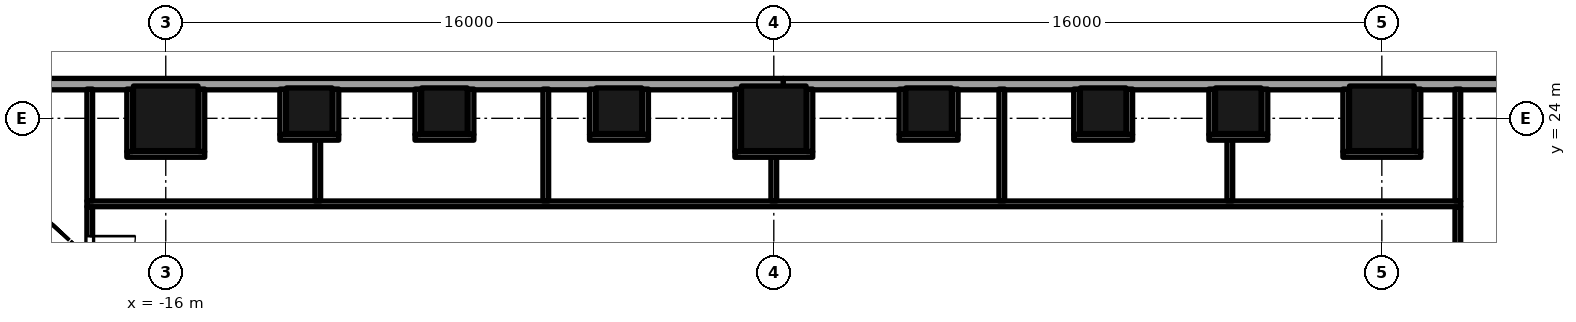
"""IFC4 building model, lengths in metres.
Left out: names, types, materials, properties, quantities, classifications, styles, units other than length and angle.
Written with IfcOpenShell. Run it as: python <this file> out.ifc"""

import sys

from ifc_helpers import new_model, si_unit, direction, frame, frame_2d, origin, origin_2d, place, context, subcontext, project, spatial, rectangle, extrude, element, fill, save


model = new_model("IFC4")
c1 = context("Model", 3, precision=1e-05, world=origin(), true_north=direction((0.0, 1.0)))
c2 = subcontext(c1, "Body", "Model", "MODEL_VIEW")
j1 = project(units=[si_unit("LENGTHUNIT", "METRE"), si_unit("PLANEANGLEUNIT", "RADIAN")], contexts=[c1])
p1 = place(None, origin())
s1 = spatial("IfcSite", under=j1, at=p1, CompositionType="ELEMENT")
p2 = place(p1, origin())
s2 = spatial("IfcBuilding", under=s1, at=p2, CompositionType="ELEMENT")
p3 = place(p2, origin())
s3 = spatial("IfcBuildingStorey", under=s2, at=p3, CompositionType="ELEMENT", Elevation=0.0)
for number, where, z_axis, x_axis in (
    (1, (-16.0, 24.0, 0.0), (0.0, 0.0, 1.0), (1.0, 0.0, 0.0)),
    (2, (0.0, 24.0, 0.0), (0.0, 0.0, 1.0), (1.0, 0.0, 0.0)),
    (3, (16.0, 24.0, 0.0), (0.0, 0.0, 1.0), (1.0, 0.0, 0.0)),
):
    element("IfcColumn", number, at=place(p3, frame(where, z_axis=z_axis, x_axis=x_axis)), inside=s3, PredefinedType="COLUMN", context=c2, shape_type="SweptSolid", body=[
        extrude(rectangle(XDim=1.7, YDim=1.7, at=origin_2d()), origin(), (0.0, 0.0, 1.0), 9.0),
    ])
for number, where, z_axis, x_axis in (
    (4, (-8.667, 24.2, 0.0), (0.0, 0.0, 1.0), (1.0, 0.0, 0.0)),
    (5, (8.667, 24.2, 0.0), (0.0, 0.0, 1.0), (1.0, 0.0, 0.0)),
    (6, (-12.223, 24.2, 0.0), (0.0, 0.0, 1.0), (1.0, 0.0, 0.0)),
    (7, (-4.074, 24.2, 0.0), (0.0, 0.0, 1.0), (1.0, 0.0, 0.0)),
    (8, (4.074, 24.2, 0.0), (0.0, 0.0, 1.0), (1.0, 0.0, 0.0)),
    (9, (12.223, 24.2, 0.0), (0.0, 0.0, 1.0), (1.0, 0.0, 0.0)),
):
    element("IfcColumn", number, at=place(p3, frame(where, z_axis=z_axis, x_axis=x_axis)), inside=s3, PredefinedType="COLUMN", context=c2, shape_type="SweptSolid", body=[
        extrude(rectangle(XDim=1.2, YDim=1.2, at=origin_2d()), origin(), (0.0, 0.0, 1.0), 9.0),
    ])
p4 = place(p3, frame((25.396, 24.9, 0.0), z_axis=(0.0, 0.0, 1.0), x_axis=(-1.0, 0.0, 0.0)))
e10 = element("IfcWall", 10, at=p4, inside=s3, PredefinedType="ELEMENTEDWALL", context=c2, shape_type="SweptSolid", body=[
    extrude(rectangle(XDim=25.15, YDim=0.3, at=frame_2d((12.575, 0.0))), origin(), (0.0, 0.0, 1.0), 7.6),
])
p5 = place(p4, frame((0.4, 0.0, 0.0)))
e11 = element("IfcOpeningElement", 11, at=p5, cuts=e10, PredefinedType="OPENING", context=c2, shape_type="SweptSolid", body=[
    extrude(rectangle(XDim=3.0, YDim=2.7, at=frame_2d((1.5, 1.35))), frame((0.0, 0.16, 0.0), z_axis=(0.0, -1.0, 0.0), x_axis=(1.0, 0.0, 0.0)), (0.0, 0.0, 1.0), 0.32),
])
p6 = place(p3, frame((0.246, 24.9, 0.0), z_axis=(0.0, 0.0, 1.0), x_axis=(-1.0, 0.0, 0.0)))
e12 = element("IfcWall", 12, at=p6, inside=s3, PredefinedType="ELEMENTEDWALL", context=c2, shape_type="SweptSolid", body=[
    extrude(rectangle(XDim=25.15, YDim=0.3, at=frame_2d((12.575, 0.0))), origin(), (0.0, 0.0, 1.0), 7.6),
])
p7 = place(p6, frame((21.75, 0.0, 0.0)))
e13 = element("IfcOpeningElement", 13, at=p7, cuts=e12, PredefinedType="OPENING", context=c2, shape_type="SweptSolid", body=[
    extrude(rectangle(XDim=3.0, YDim=2.7, at=frame_2d((1.5, 1.35))), frame((0.0, 0.16, 0.0), z_axis=(0.0, -1.0, 0.0), x_axis=(1.0, 0.0, 0.0)), (0.0, 0.0, 1.0), 0.32),
])
p8 = place(p3, frame((-18.0, 19.278, 0.0), z_axis=(0.0, 0.0, 1.0), x_axis=(0.0, 1.0, 0.0)))
e14 = element("IfcWall", 14, at=p8, inside=s3, PredefinedType="PARTITIONING", context=c2, shape_type="SweptSolid", body=[
    extrude(rectangle(XDim=2.397, YDim=0.15, at=frame_2d((1.198, 0.0))), origin(), (0.0, 0.0, 1.0), 8.5),
])
p9 = place(p8, frame((0.422, 0.0, 0.0)))
e15 = element("IfcOpeningElement", 15, at=p9, cuts=e14, PredefinedType="OPENING", context=c2, shape_type="SweptSolid", body=[
    extrude(rectangle(XDim=1.2, YDim=2.1, at=frame_2d((0.6, 1.05))), frame((0.0, 0.085, 0.0), z_axis=(0.0, -1.0, 0.0), x_axis=(1.0, 0.0, 0.0)), (0.0, 0.0, 1.0), 0.17),
])
p10 = place(p3, frame((18.0, 19.278, 0.0), z_axis=(0.0, 0.0, 1.0), x_axis=(0.0, 1.0, 0.0)))
e16 = element("IfcWall", 16, at=p10, inside=s3, PredefinedType="PARTITIONING", context=c2, shape_type="SweptSolid", body=[
    extrude(rectangle(XDim=2.397, YDim=0.15, at=frame_2d((1.198, 0.0))), origin(), (0.0, 0.0, 1.0), 8.5),
])
p11 = place(p3, frame((-18.075, 21.75, 0.0), z_axis=(0.0, 0.0, 1.0), x_axis=(1.0, 0.0, 0.0)))
e17 = element("IfcWall", 17, at=p11, inside=s3, PredefinedType="PARTITIONING", context=c2, shape_type="SweptSolid", body=[
    extrude(rectangle(XDim=36.15, YDim=0.15, at=frame_2d((18.075, 0.0))), origin(), (0.0, 0.0, 1.0), 7.3),
])
p12 = place(p11, frame((2.675, 0.0, 0.0)))
e18 = element("IfcOpeningElement", 18, at=p12, cuts=e17, PredefinedType="OPENING", context=c2, shape_type="SweptSolid", body=[
    extrude(rectangle(XDim=0.9, YDim=2.1, at=frame_2d((0.45, 1.05))), frame((0.0, 0.085, 0.0), z_axis=(0.0, -1.0, 0.0), x_axis=(1.0, 0.0, 0.0)), (0.0, 0.0, 1.0), 0.17),
])
p13 = place(p11, frame((8.675, 0.0, 0.0)))
e19 = element("IfcOpeningElement", 19, at=p13, cuts=e17, PredefinedType="OPENING", context=c2, shape_type="SweptSolid", body=[
    extrude(rectangle(XDim=0.9, YDim=2.1, at=frame_2d((0.45, 1.05))), frame((0.0, 0.085, 0.0), z_axis=(0.0, -1.0, 0.0), x_axis=(1.0, 0.0, 0.0)), (0.0, 0.0, 1.0), 0.17),
])
p14 = place(p11, frame((14.675, 0.0, 0.0)))
e20 = element("IfcOpeningElement", 20, at=p14, cuts=e17, PredefinedType="OPENING", context=c2, shape_type="SweptSolid", body=[
    extrude(rectangle(XDim=0.9, YDim=2.1, at=frame_2d((0.45, 1.05))), frame((0.0, 0.085, 0.0), z_axis=(0.0, -1.0, 0.0), x_axis=(1.0, 0.0, 0.0)), (0.0, 0.0, 1.0), 0.17),
])
p15 = place(p11, frame((20.675, 0.0, 0.0)))
e21 = element("IfcOpeningElement", 21, at=p15, cuts=e17, PredefinedType="OPENING", context=c2, shape_type="SweptSolid", body=[
    extrude(rectangle(XDim=0.9, YDim=2.1, at=frame_2d((0.45, 1.05))), frame((0.0, 0.085, 0.0), z_axis=(0.0, -1.0, 0.0), x_axis=(1.0, 0.0, 0.0)), (0.0, 0.0, 1.0), 0.17),
])
p16 = place(p11, frame((26.675, 0.0, 0.0)))
e22 = element("IfcOpeningElement", 22, at=p16, cuts=e17, PredefinedType="OPENING", context=c2, shape_type="SweptSolid", body=[
    extrude(rectangle(XDim=0.9, YDim=2.1, at=frame_2d((0.45, 1.05))), frame((0.0, 0.085, 0.0), z_axis=(0.0, -1.0, 0.0), x_axis=(1.0, 0.0, 0.0)), (0.0, 0.0, 1.0), 0.17),
])
p17 = place(p11, frame((32.675, 0.0, 0.0)))
e23 = element("IfcOpeningElement", 23, at=p17, cuts=e17, PredefinedType="OPENING", context=c2, shape_type="SweptSolid", body=[
    extrude(rectangle(XDim=0.9, YDim=2.1, at=frame_2d((0.45, 1.05))), frame((0.0, 0.085, 0.0), z_axis=(0.0, -1.0, 0.0), x_axis=(1.0, 0.0, 0.0)), (0.0, 0.0, 1.0), 0.17),
])
p18 = place(p3, frame((-18.0, 21.825, 0.0), z_axis=(0.0, 0.0, 1.0), x_axis=(0.0, 1.0, 0.0)))
e24 = element("IfcWall", 24, at=p18, inside=s3, PredefinedType="PARTITIONING", context=c2, shape_type="SweptSolid", body=[
    extrude(rectangle(XDim=2.945, YDim=0.15, at=frame_2d((1.473, 0.0))), origin(), (0.0, 0.0, 1.0), 7.3),
])
p19 = place(p3, frame((-12.0, 21.825, 0.0), z_axis=(0.0, 0.0, 1.0), x_axis=(0.0, 1.0, 0.0)))
e25 = element("IfcWall", 25, at=p19, inside=s3, PredefinedType="PARTITIONING", context=c2, shape_type="SweptSolid", body=[
    extrude(rectangle(XDim=1.775, YDim=0.15, at=frame_2d((0.888, 0.0))), origin(), (0.0, 0.0, 1.0), 8.5),
])
p20 = place(p3, frame((-6.0, 21.825, 0.0), z_axis=(0.0, 0.0, 1.0), x_axis=(0.0, 1.0, 0.0)))
e26 = element("IfcWall", 26, at=p20, inside=s3, PredefinedType="PARTITIONING", context=c2, shape_type="SweptSolid", body=[
    extrude(rectangle(XDim=2.945, YDim=0.15, at=frame_2d((1.473, 0.0))), origin(), (0.0, 0.0, 1.0), 7.3),
])
p21 = place(p3, frame((0.0, 21.825, 0.0), z_axis=(0.0, 0.0, 1.0), x_axis=(0.0, 1.0, 0.0)))
e27 = element("IfcWall", 27, at=p21, inside=s3, PredefinedType="PARTITIONING", context=c2, shape_type="SweptSolid", body=[
    extrude(rectangle(XDim=1.325, YDim=0.15, at=frame_2d((0.663, 0.0))), origin(), (0.0, 0.0, 1.0), 7.3),
])
p22 = place(p3, frame((6.0, 21.825, 0.0), z_axis=(0.0, 0.0, 1.0), x_axis=(0.0, 1.0, 0.0)))
e28 = element("IfcWall", 28, at=p22, inside=s3, PredefinedType="PARTITIONING", context=c2, shape_type="SweptSolid", body=[
    extrude(rectangle(XDim=2.945, YDim=0.15, at=frame_2d((1.473, 0.0))), origin(), (0.0, 0.0, 1.0), 7.3),
])
p23 = place(p3, frame((12.0, 21.825, 0.0), z_axis=(0.0, 0.0, 1.0), x_axis=(0.0, 1.0, 0.0)))
e29 = element("IfcWall", 29, at=p23, inside=s3, PredefinedType="PARTITIONING", context=c2, shape_type="SweptSolid", body=[
    extrude(rectangle(XDim=1.775, YDim=0.15, at=frame_2d((0.888, 0.0))), origin(), (0.0, 0.0, 1.0), 8.5),
])
p24 = place(p3, frame((18.0, 21.825, 0.0), z_axis=(0.0, 0.0, 1.0), x_axis=(0.0, 1.0, 0.0)))
e30 = element("IfcWall", 30, at=p24, inside=s3, PredefinedType="PARTITIONING", context=c2, shape_type="SweptSolid", body=[
    extrude(rectangle(XDim=2.945, YDim=0.15, at=frame_2d((1.473, 0.0))), origin(), (0.0, 0.0, 1.0), 7.3),
])
for number, where, z_axis, x_axis in (
    (31, (-17.025, 23.05, 0.0), (0.0, 0.0, 1.0), (1.0, 0.0, 0.0)),
    (32, (-1.025, 23.05, 0.0), (0.0, 0.0, 1.0), (1.0, 0.0, 0.0)),
    (33, (14.975, 23.05, 0.0), (0.0, 0.0, 1.0), (1.0, 0.0, 0.0)),
):
    element("IfcWall", number, at=place(p3, frame(where, z_axis=z_axis, x_axis=x_axis)), inside=s3, PredefinedType="PARTITIONING", context=c2, shape_type="SweptSolid", body=[
        extrude(rectangle(XDim=2.05, YDim=0.15, at=frame_2d((1.025, 0.0))), origin(), (0.0, 0.0, 1.0), 7.3),
    ])
for number, where, z_axis, x_axis in (
    (34, (-16.95, 23.125, 0.0), (0.0, 0.0, 1.0), (0.0, 1.0, 0.0)),
    (35, (-15.05, 23.125, 0.0), (0.0, 0.0, 1.0), (0.0, 1.0, 0.0)),
    (36, (-0.95, 23.125, 0.0), (0.0, 0.0, 1.0), (0.0, 1.0, 0.0)),
    (37, (0.95, 23.125, 0.0), (0.0, 0.0, 1.0), (0.0, 1.0, 0.0)),
    (38, (15.05, 23.125, 0.0), (0.0, 0.0, 1.0), (0.0, 1.0, 0.0)),
    (39, (16.95, 23.125, 0.0), (0.0, 0.0, 1.0), (0.0, 1.0, 0.0)),
):
    element("IfcWall", number, at=place(p3, frame(where, z_axis=z_axis, x_axis=x_axis)), inside=s3, PredefinedType="PARTITIONING", context=c2, shape_type="SweptSolid", body=[
        extrude(rectangle(XDim=1.645, YDim=0.15, at=frame_2d((0.823, 0.0))), origin(), (0.0, 0.0, 1.0), 7.3),
    ])
p25 = place(p3, frame((-12.998, 23.5, 0.0), z_axis=(0.0, 0.0, 1.0), x_axis=(1.0, 0.0, 0.0)))
e40 = element("IfcWall", 40, at=p25, inside=s3, PredefinedType="PARTITIONING", context=c2, shape_type="SweptSolid", body=[
    extrude(rectangle(XDim=1.55, YDim=0.15, at=frame_2d((0.775, 0.0))), origin(), (0.0, 0.0, 1.0), 8.5),
])
p26 = place(p3, frame((-9.442, 23.5, 0.0), z_axis=(0.0, 0.0, 1.0), x_axis=(1.0, 0.0, 0.0)))
e41 = element("IfcWall", 41, at=p26, inside=s3, PredefinedType="PARTITIONING", context=c2, shape_type="SweptSolid", body=[
    extrude(rectangle(XDim=1.55, YDim=0.15, at=frame_2d((0.775, 0.0))), origin(), (0.0, 0.0, 1.0), 7.6),
])
for number, where, z_axis, x_axis in (
    (42, (-4.849, 23.5, 0.0), (0.0, 0.0, 1.0), (1.0, 0.0, 0.0)),
    (43, (3.299, 23.5, 0.0), (0.0, 0.0, 1.0), (1.0, 0.0, 0.0)),
):
    element("IfcWall", number, at=place(p3, frame(where, z_axis=z_axis, x_axis=x_axis)), inside=s3, PredefinedType="PARTITIONING", context=c2, shape_type="SweptSolid", body=[
        extrude(rectangle(XDim=1.55, YDim=0.15, at=frame_2d((0.775, 0.0))), origin(), (0.0, 0.0, 1.0), 8.5),
    ])
p27 = place(p3, frame((7.892, 23.5, 0.0), z_axis=(0.0, 0.0, 1.0), x_axis=(1.0, 0.0, 0.0)))
e44 = element("IfcWall", 44, at=p27, inside=s3, PredefinedType="PARTITIONING", context=c2, shape_type="SweptSolid", body=[
    extrude(rectangle(XDim=1.55, YDim=0.15, at=frame_2d((0.775, 0.0))), origin(), (0.0, 0.0, 1.0), 7.6),
])
p28 = place(p3, frame((11.448, 23.5, 0.0), z_axis=(0.0, 0.0, 1.0), x_axis=(1.0, 0.0, 0.0)))
e45 = element("IfcWall", 45, at=p28, inside=s3, PredefinedType="PARTITIONING", context=c2, shape_type="SweptSolid", body=[
    extrude(rectangle(XDim=1.55, YDim=0.15, at=frame_2d((0.775, 0.0))), origin(), (0.0, 0.0, 1.0), 8.5),
])
for number, where, z_axis, x_axis in (
    (46, (-12.923, 23.575, 0.0), (0.0, 0.0, 1.0), (0.0, 1.0, 0.0)),
    (47, (-11.523, 23.575, 0.0), (0.0, 0.0, 1.0), (0.0, 1.0, 0.0)),
    (48, (-9.367, 23.575, 0.0), (0.0, 0.0, 1.0), (0.0, 1.0, 0.0)),
    (49, (-7.967, 23.575, 0.0), (0.0, 0.0, 1.0), (0.0, 1.0, 0.0)),
    (50, (-4.774, 23.575, 0.0), (0.0, 0.0, 1.0), (0.0, 1.0, 0.0)),
    (51, (-3.374, 23.575, 0.0), (0.0, 0.0, 1.0), (0.0, 1.0, 0.0)),
    (52, (3.374, 23.575, 0.0), (0.0, 0.0, 1.0), (0.0, 1.0, 0.0)),
    (53, (4.774, 23.575, 0.0), (0.0, 0.0, 1.0), (0.0, 1.0, 0.0)),
    (54, (7.967, 23.575, 0.0), (0.0, 0.0, 1.0), (0.0, 1.0, 0.0)),
    (55, (9.367, 23.575, 0.0), (0.0, 0.0, 1.0), (0.0, 1.0, 0.0)),
    (56, (11.523, 23.575, 0.0), (0.0, 0.0, 1.0), (0.0, 1.0, 0.0)),
    (57, (12.923, 23.575, 0.0), (0.0, 0.0, 1.0), (0.0, 1.0, 0.0)),
):
    element("IfcWall", number, at=place(p3, frame(where, z_axis=z_axis, x_axis=x_axis)), inside=s3, PredefinedType="PARTITIONING", context=c2, shape_type="SweptSolid", body=[
        extrude(rectangle(XDim=1.195, YDim=0.15, at=frame_2d((0.598, 0.0))), origin(), (0.0, 0.0, 1.0), 7.3),
    ])
p29 = place(p9, origin())
e58 = element("IfcDoor", 58, at=p29, inside=s3, OperationType="SINGLE_SWING_RIGHT", PredefinedType="DOOR", context=c2, shape_type="SweptSolid", body=[
    extrude(rectangle(XDim=1.2, YDim=2.1, at=frame_2d((0.6, 1.05))), frame((0.0, 0.025, 0.0), z_axis=(0.0, -1.0, 0.0), x_axis=(1.0, 0.0, 0.0)), (0.0, 0.0, 1.0), 0.05),
])
fill(e15, e58)
p30 = place(p12, origin())
e59 = element("IfcDoor", 59, at=p30, inside=s3, OperationType="SINGLE_SWING_LEFT", PredefinedType="DOOR", context=c2, shape_type="SweptSolid", body=[
    extrude(rectangle(XDim=0.9, YDim=2.1, at=frame_2d((0.45, 1.05))), frame((0.0, 0.025, 0.0), z_axis=(0.0, -1.0, 0.0), x_axis=(1.0, 0.0, 0.0)), (0.0, 0.0, 1.0), 0.05),
])
fill(e18, e59)
p31 = place(p13, origin())
e60 = element("IfcDoor", 60, at=p31, inside=s3, OperationType="SINGLE_SWING_RIGHT", PredefinedType="DOOR", context=c2, shape_type="SweptSolid", body=[
    extrude(rectangle(XDim=0.9, YDim=2.1, at=frame_2d((0.45, 1.05))), frame((0.0, 0.025, 0.0), z_axis=(0.0, -1.0, 0.0), x_axis=(1.0, 0.0, 0.0)), (0.0, 0.0, 1.0), 0.05),
])
fill(e19, e60)
p32 = place(p14, origin())
e61 = element("IfcDoor", 61, at=p32, inside=s3, OperationType="SINGLE_SWING_RIGHT", PredefinedType="DOOR", context=c2, shape_type="SweptSolid", body=[
    extrude(rectangle(XDim=0.9, YDim=2.1, at=frame_2d((0.45, 1.05))), frame((0.0, 0.025, 0.0), z_axis=(0.0, -1.0, 0.0), x_axis=(1.0, 0.0, 0.0)), (0.0, 0.0, 1.0), 0.05),
])
fill(e20, e61)
p33 = place(p15, origin())
e62 = element("IfcDoor", 62, at=p33, inside=s3, OperationType="SINGLE_SWING_RIGHT", PredefinedType="DOOR", context=c2, shape_type="SweptSolid", body=[
    extrude(rectangle(XDim=0.9, YDim=2.1, at=frame_2d((0.45, 1.05))), frame((0.0, 0.025, 0.0), z_axis=(0.0, -1.0, 0.0), x_axis=(1.0, 0.0, 0.0)), (0.0, 0.0, 1.0), 0.05),
])
fill(e21, e62)
p34 = place(p16, origin())
e63 = element("IfcDoor", 63, at=p34, inside=s3, OperationType="SINGLE_SWING_LEFT", PredefinedType="DOOR", context=c2, shape_type="SweptSolid", body=[
    extrude(rectangle(XDim=0.9, YDim=2.1, at=frame_2d((0.45, 1.05))), frame((0.0, 0.025, 0.0), z_axis=(0.0, -1.0, 0.0), x_axis=(1.0, 0.0, 0.0)), (0.0, 0.0, 1.0), 0.05),
])
fill(e22, e63)
p35 = place(p17, origin())
e64 = element("IfcDoor", 64, at=p35, inside=s3, OperationType="SINGLE_SWING_RIGHT", PredefinedType="DOOR", context=c2, shape_type="SweptSolid", body=[
    extrude(rectangle(XDim=0.9, YDim=2.1, at=frame_2d((0.45, 1.05))), frame((0.0, 0.025, 0.0), z_axis=(0.0, -1.0, 0.0), x_axis=(1.0, 0.0, 0.0)), (0.0, 0.0, 1.0), 0.05),
])
fill(e23, e64)
save(model, sys.argv[1])
